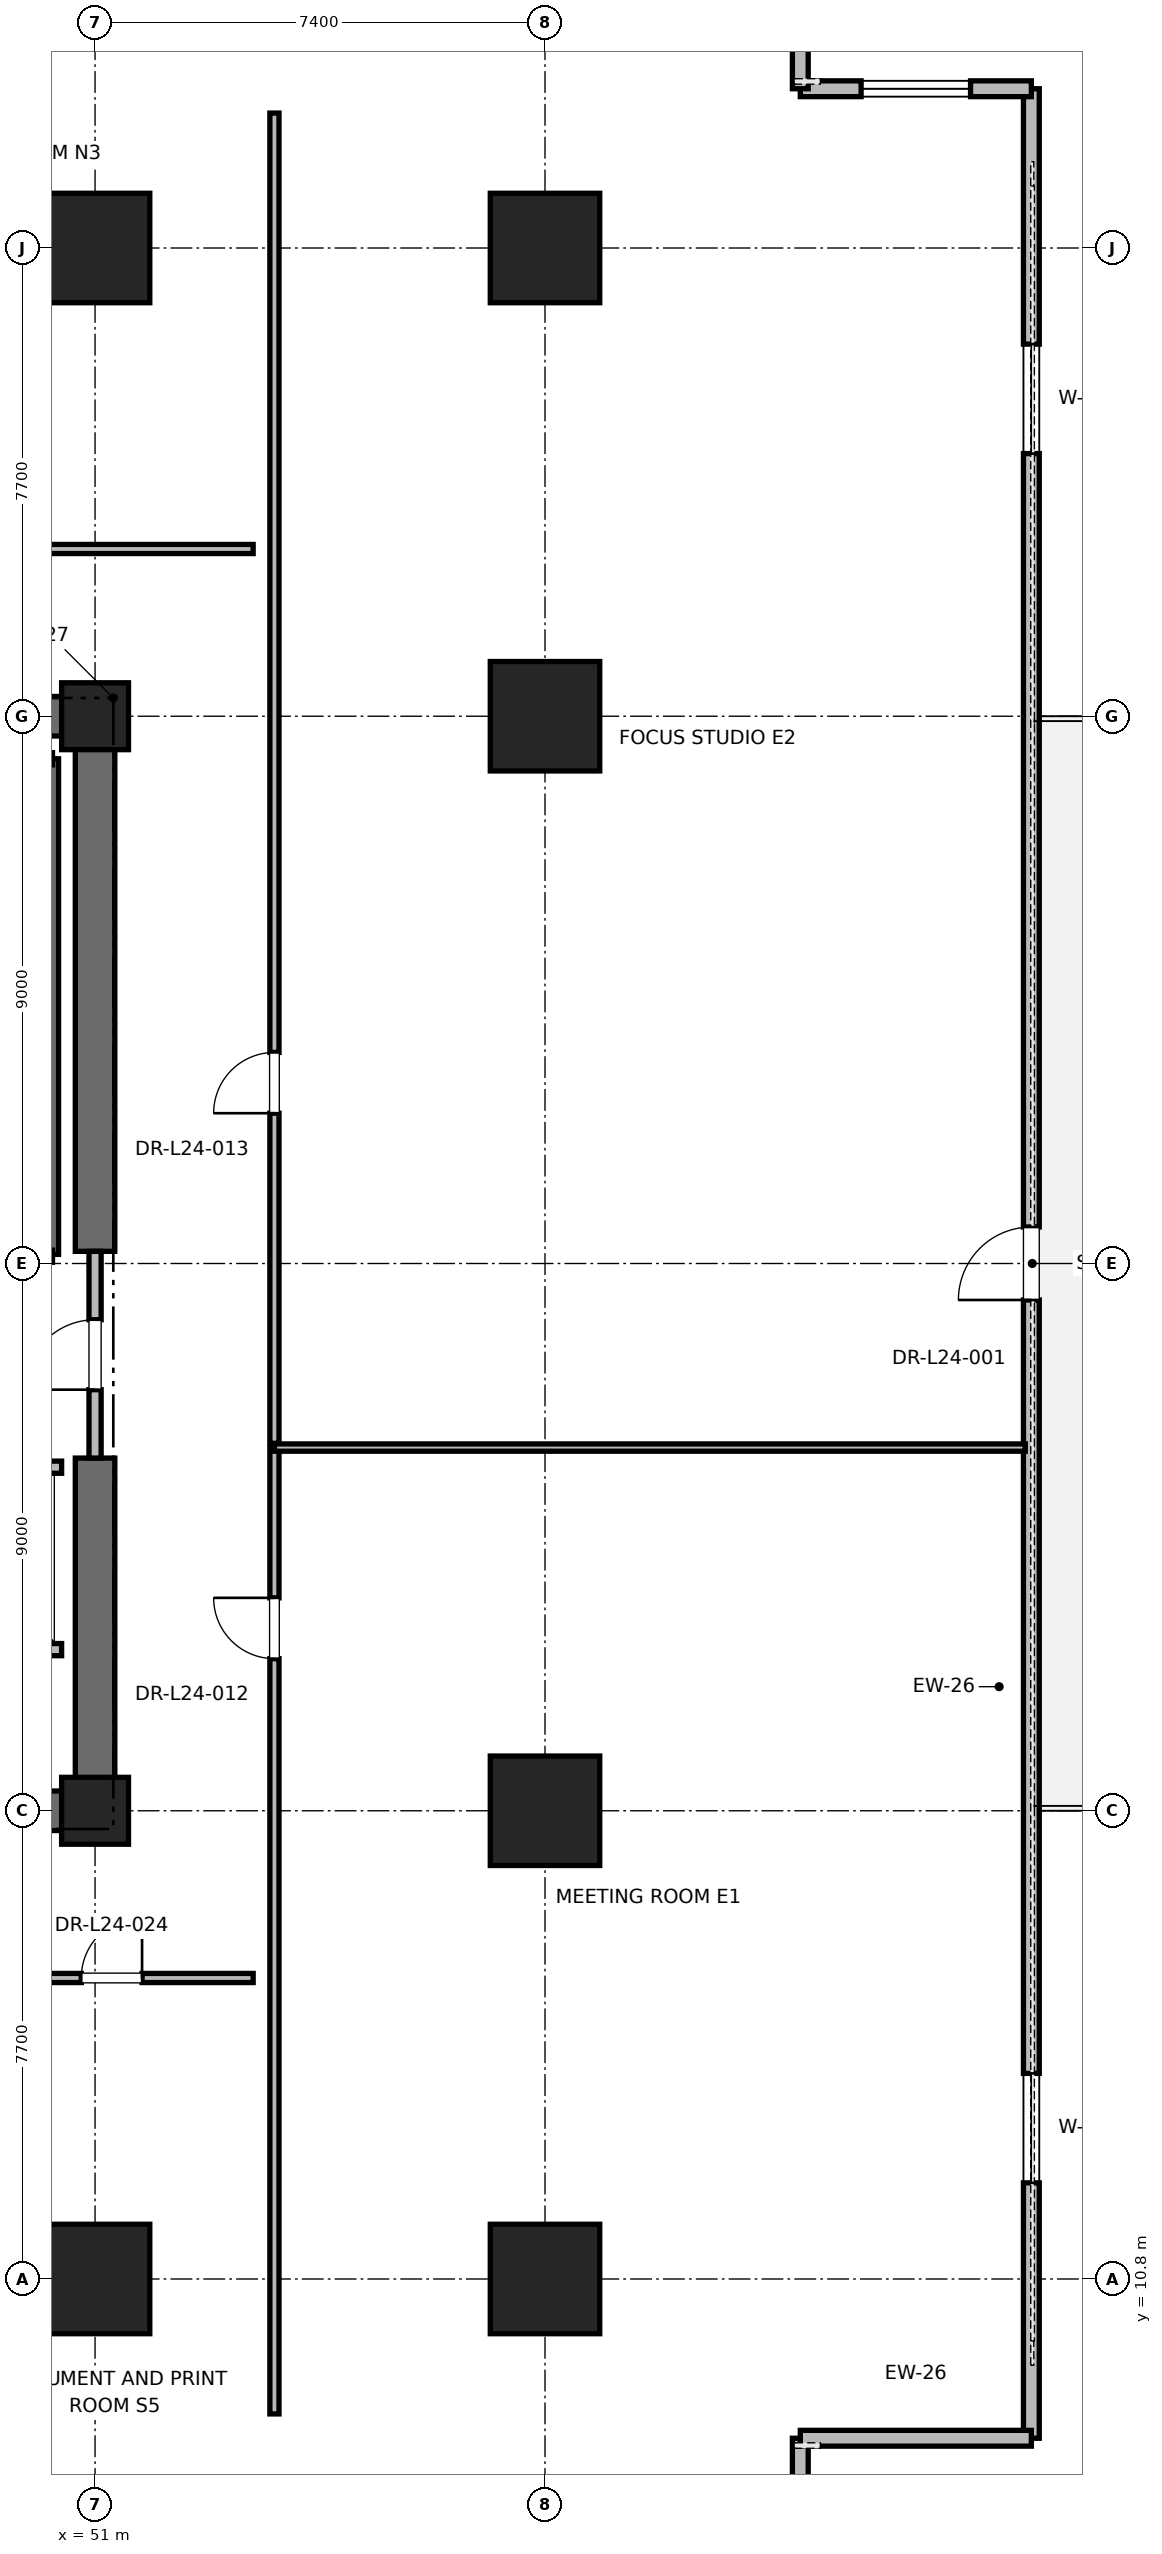
"""IFC4 building model, lengths in metres.
Left out: names, types, materials, properties, quantities, classifications, styles, units other than length and angle.
Written with IfcOpenShell. Run it as: python <this file> out.ifc"""

import sys

from ifc_helpers import new_model, si_unit, direction, frame, frame_2d, origin, origin_2d, place, context, subcontext, project, spatial, rectangle, extrude, element, fill, save


model = new_model("IFC4")
c1 = context("Model", 3, precision=1e-05, world=origin(), true_north=direction((0.0, 1.0)))
c2 = subcontext(c1, "Body", "Model", "MODEL_VIEW")
j1 = project(units=[si_unit("LENGTHUNIT", "METRE"), si_unit("PLANEANGLEUNIT", "RADIAN")], contexts=[c1])
p1 = place(None, origin())
s1 = spatial("IfcSite", under=j1, at=p1, CompositionType="ELEMENT")
p2 = place(p1, origin())
s2 = spatial("IfcBuilding", under=s1, at=p2, CompositionType="ELEMENT")
p3 = place(p2, frame((0.0, 0.0, 103.6)))
s3 = spatial("IfcBuildingStorey", under=s2, at=p3, CompositionType="ELEMENT", Elevation=103.6)
for number, where, z_axis, x_axis in (
    (1, (51.0, 10.8, 0.0), (0.0, 0.0, 1.0), (1.0, 0.0, 0.0)),
    (2, (51.0, 44.2, 0.0), (0.0, 0.0, 1.0), (1.0, 0.0, 0.0)),
    (3, (58.4, 18.5, 0.0), (0.0, 0.0, 1.0), (1.0, 0.0, 0.0)),
    (4, (58.4, 36.5, 0.0), (0.0, 0.0, 1.0), (1.0, 0.0, 0.0)),
    (5, (58.4, 10.8, 0.0), (0.0, 0.0, 1.0), (1.0, 0.0, 0.0)),
    (6, (58.4, 44.2, 0.0), (0.0, 0.0, 1.0), (1.0, 0.0, 0.0)),
):
    element("IfcColumn", number, at=place(p3, frame(where, z_axis=z_axis, x_axis=x_axis)), inside=s3, PredefinedType="COLUMN", context=c2, shape_type="SweptSolid", body=[
        extrude(rectangle(XDim=1.8, YDim=1.8, at=origin_2d()), origin(), (0.0, 0.0, 1.0), 4.0),
    ])
for number, where, z_axis, x_axis in (
    (7, (51.0, 18.5, 0.0), (0.0, 0.0, 1.0), (1.0, 0.0, 0.0)),
    (8, (51.0, 36.5, 0.0), (0.0, 0.0, 1.0), (1.0, 0.0, 0.0)),
):
    element("IfcColumn", number, at=place(p3, frame(where, z_axis=z_axis, x_axis=x_axis)), inside=s3, PredefinedType="PILASTER", context=c2, shape_type="SweptSolid", body=[
        extrude(rectangle(XDim=1.1, YDim=1.1, at=origin_2d()), origin(), (0.0, 0.0, 1.0), 4.0),
    ])
p4 = place(p3, frame((41.8, 18.5, 0.0), z_axis=(0.0, 0.0, 1.0), x_axis=(1.0, 0.0, 0.0)))
e9 = element("IfcWall", 9, at=p4, inside=s3, PredefinedType="SHEAR", context=c2, shape_type="SweptSolid", body=[
    extrude(rectangle(XDim=9.2, YDim=0.65, at=frame_2d((4.6, 0.0))), origin(), (0.0, 0.0, 1.0), 3.7),
])
for number, where, z_axis, x_axis in (
    (10, (45.2, 36.5, 0.0), (0.0, 0.0, 1.0), (1.0, 0.0, 0.0)),
    (11, (51.0, 18.5, 0.0), (0.0, 0.0, 1.0), (0.0, 1.0, 0.0)),
):
    element("IfcWall", number, at=place(p3, frame(where, z_axis=z_axis, x_axis=x_axis)), inside=s3, PredefinedType="SHEAR", context=c2, shape_type="SweptSolid", body=[
        extrude(rectangle(XDim=5.8, YDim=0.65, at=frame_2d((2.9, 0.0))), origin(), (0.0, 0.0, 1.0), 3.7),
    ])
p5 = place(p3, frame((51.0, 27.7, 0.0), z_axis=(0.0, 0.0, 1.0), x_axis=(0.0, 1.0, 0.0)))
e12 = element("IfcWall", 12, at=p5, inside=s3, PredefinedType="SHEAR", context=c2, shape_type="SweptSolid", body=[
    extrude(rectangle(XDim=8.8, YDim=0.65, at=frame_2d((4.4, 0.0))), origin(), (0.0, 0.0, 1.0), 3.7),
])
p6 = place(p3, frame((66.399, 8.181, 0.0), z_axis=(0.0, 0.0, 1.0), x_axis=(0.0, 1.0, 0.0)))
e13 = element("IfcWall", 13, at=p6, inside=s3, PredefinedType="PARAPET", context=c2, shape_type="SweptSolid", body=[
    extrude(rectangle(XDim=38.638, YDim=0.26, at=frame_2d((19.319, 0.0))), origin(), (0.0, 0.0, 1.0), 2.753),
])
p7 = place(p6, frame((4.2, 0.0, 0.85)))
e14 = element("IfcOpeningElement", 14, at=p7, cuts=e13, PredefinedType="OPENING", context=c2, shape_type="SweptSolid", body=[
    extrude(rectangle(XDim=1.8, YDim=2.2, at=frame_2d((0.9, 1.1))), frame((0.0, 0.13, 0.0), z_axis=(0.0, -1.0, 0.0), x_axis=(1.0, 0.0, 0.0)), (0.0, 0.0, 1.0), 0.26),
])
p8 = place(p6, frame((18.719, 0.0, 0.0)))
e15 = element("IfcOpeningElement", 15, at=p8, cuts=e13, PredefinedType="OPENING", context=c2, shape_type="SweptSolid", body=[
    extrude(rectangle(XDim=1.2, YDim=2.2, at=frame_2d((0.6, 1.1))), frame((0.0, 0.13, 0.0), z_axis=(0.0, -1.0, 0.0), x_axis=(1.0, 0.0, 0.0)), (0.0, 0.0, 1.0), 0.26),
])
p9 = place(p6, frame((32.638, 0.0, 0.85)))
e16 = element("IfcOpeningElement", 16, at=p9, cuts=e13, PredefinedType="OPENING", context=c2, shape_type="SweptSolid", body=[
    extrude(rectangle(XDim=1.8, YDim=2.2, at=frame_2d((0.9, 1.1))), frame((0.0, 0.13, 0.0), z_axis=(0.0, -1.0, 0.0), x_axis=(1.0, 0.0, 0.0)), (0.0, 0.0, 1.0), 0.26),
])
p10 = place(p3, frame((62.599, 4.781, 0.0), z_axis=(0.0, 0.0, 1.0), x_axis=(0.0, 1.0, 0.0)))
e17 = element("IfcWall", 17, at=p10, inside=s3, PredefinedType="PARAPET", context=c2, shape_type="SweptSolid", body=[
    extrude(rectangle(XDim=3.4, YDim=0.26, at=frame_2d((1.7, 0.0))), origin(), (0.0, 0.0, 1.0), 3.7),
])
p11 = place(p10, frame((0.8, 0.0, 0.85)))
e18 = element("IfcOpeningElement", 18, at=p11, cuts=e17, PredefinedType="OPENING", context=c2, shape_type="SweptSolid", body=[
    extrude(rectangle(XDim=1.8, YDim=2.2, at=frame_2d((0.9, 1.1))), frame((0.0, 0.13, 0.0), z_axis=(0.0, -1.0, 0.0), x_axis=(1.0, 0.0, 0.0)), (0.0, 0.0, 1.0), 0.26),
])
p12 = place(p3, frame((62.599, 8.181, 0.0), z_axis=(0.0, 0.0, 1.0), x_axis=(1.0, 0.0, 0.0)))
e19 = element("IfcWall", 19, at=p12, inside=s3, PredefinedType="PARAPET", context=c2, shape_type="SweptSolid", body=[
    extrude(rectangle(XDim=3.8, YDim=0.26, at=frame_2d((1.9, 0.0))), origin(), (0.0, 0.0, 1.0), 3.7),
])
p13 = place(p3, frame((66.399, 46.819, 0.0), z_axis=(0.0, 0.0, 1.0), x_axis=(-1.0, 0.0, 0.0)))
e20 = element("IfcWall", 20, at=p13, inside=s3, PredefinedType="PARAPET", context=c2, shape_type="SweptSolid", body=[
    extrude(rectangle(XDim=3.8, YDim=0.26, at=frame_2d((1.9, 0.0))), origin(), (0.0, 0.0, 1.0), 3.7),
])
p14 = place(p13, frame((1.0, 0.0, 0.85)))
e21 = element("IfcOpeningElement", 21, at=p14, cuts=e20, PredefinedType="OPENING", context=c2, shape_type="SweptSolid", body=[
    extrude(rectangle(XDim=1.8, YDim=2.2, at=frame_2d((0.9, 1.1))), frame((0.0, 0.13, 0.0), z_axis=(0.0, -1.0, 0.0), x_axis=(1.0, 0.0, 0.0)), (0.0, 0.0, 1.0), 0.26),
])
p15 = place(p3, frame((62.599, 46.819, 0.0), z_axis=(0.0, 0.0, 1.0), x_axis=(0.0, 1.0, 0.0)))
e22 = element("IfcWall", 22, at=p15, inside=s3, PredefinedType="PARAPET", context=c2, shape_type="SweptSolid", body=[
    extrude(rectangle(XDim=3.4, YDim=0.26, at=frame_2d((1.7, 0.0))), origin(), (0.0, 0.0, 1.0), 3.7),
])
p16 = place(p3, frame((50.3, 27.65, 0.0), z_axis=(0.0, 0.0, 1.0), x_axis=(0.0, 1.0, 0.0)))
e23 = element("IfcWall", 23, at=p16, inside=s3, PredefinedType="SOLIDWALL", context=c2, shape_type="SweptSolid", body=[
    extrude(rectangle(XDim=8.15, YDim=0.2, at=frame_2d((4.075, 0.0))), origin(), (0.0, 0.0, 1.0), 3.7),
])
p17 = place(p3, frame((51.0, 24.3, 0.0), z_axis=(0.0, 0.0, 1.0), x_axis=(0.0, 1.0, 0.0)))
e24 = element("IfcWall", 24, at=p17, inside=s3, PredefinedType="PARTITIONING", context=c2, shape_type="SweptSolid", body=[
    extrude(rectangle(XDim=3.4, YDim=0.2, at=frame_2d((1.7, 0.0))), origin(), (0.0, 0.0, 1.0), 2.48),
])
p18 = place(p17, frame((1.125, 0.0, 0.0)))
e25 = element("IfcOpeningElement", 25, at=p18, cuts=e24, PredefinedType="OPENING", context=c2, shape_type="SweptSolid", body=[
    extrude(rectangle(XDim=1.15, YDim=2.2, at=frame_2d((0.575, 1.1))), frame((0.0, 0.1, 0.0), z_axis=(0.0, -1.0, 0.0), x_axis=(1.0, 0.0, 0.0)), (0.0, 0.0, 1.0), 0.2),
])
p19 = place(p3, frame((47.85, 21.15, 0.0), z_axis=(0.0, 0.0, 1.0), x_axis=(1.0, 0.0, 0.0)))
e26 = element("IfcWall", 26, at=p19, inside=s3, PredefinedType="SOLIDWALL", context=c2, shape_type="SweptSolid", body=[
    extrude(rectangle(XDim=2.6, YDim=0.2, at=frame_2d((1.3, 0.0))), origin(), (0.0, 0.0, 1.0), 3.7),
])
p20 = place(p3, frame((50.45, 24.15, 0.0), z_axis=(0.0, 0.0, 1.0), x_axis=(-1.0, 0.0, 0.0)))
e27 = element("IfcWall", 27, at=p20, inside=s3, PredefinedType="SOLIDWALL", context=c2, shape_type="SweptSolid", body=[
    extrude(rectangle(XDim=2.6, YDim=0.2, at=frame_2d((1.3, 0.0))), origin(), (0.0, 0.0, 1.0), 2.48),
])
p21 = place(p20, frame((0.75, 0.0, 0.0)))
e28 = element("IfcOpeningElement", 28, at=p21, cuts=e27, PredefinedType="OPENING", context=c2, shape_type="SweptSolid", body=[
    extrude(rectangle(XDim=1.1, YDim=2.2, at=frame_2d((0.55, 1.1))), frame((0.0, 0.1, 0.0), z_axis=(0.0, -1.0, 0.0), x_axis=(1.0, 0.0, 0.0)), (0.0, 0.0, 1.0), 0.2),
])
p22 = place(p3, frame((44.694, 39.25, 0.0), z_axis=(0.0, 0.0, 1.0), x_axis=(1.0, 0.0, 0.0)))
e29 = element("IfcWall", 29, at=p22, inside=s3, PredefinedType="PARTITIONING", context=c2, shape_type="SweptSolid", body=[
    extrude(rectangle(XDim=8.906, YDim=0.15, at=frame_2d((4.453, 0.0))), origin(), (0.0, 0.0, 1.0), 2.753),
])
p23 = place(p22, frame((3.653, 0.0, 0.0)))
e30 = element("IfcOpeningElement", 30, at=p23, cuts=e29, PredefinedType="OPENING", context=c2, shape_type="SweptSolid", body=[
    extrude(rectangle(XDim=1.5, YDim=2.25, at=frame_2d((0.75, 1.125))), frame((0.0, 0.075, 0.0), z_axis=(0.0, -1.0, 0.0), x_axis=(1.0, 0.0, 0.0)), (0.0, 0.0, 1.0), 0.15),
])
p24 = place(p3, frame((49.046, 15.75, 0.0), z_axis=(0.0, 0.0, 1.0), x_axis=(1.0, 0.0, 0.0)))
e31 = element("IfcWall", 31, at=p24, inside=s3, PredefinedType="PARTITIONING", context=c2, shape_type="SweptSolid", body=[
    extrude(rectangle(XDim=4.554, YDim=0.15, at=frame_2d((2.277, 0.0))), origin(), (0.0, 0.0, 1.0), 2.753),
])
p25 = place(p24, frame((1.727, 0.0, 0.0)))
e32 = element("IfcOpeningElement", 32, at=p25, cuts=e31, PredefinedType="OPENING", context=c2, shape_type="SweptSolid", body=[
    extrude(rectangle(XDim=1.0, YDim=2.15, at=frame_2d((0.5, 1.075))), frame((0.0, 0.075, 0.0), z_axis=(0.0, -1.0, 0.0), x_axis=(1.0, 0.0, 0.0)), (0.0, 0.0, 1.0), 0.15),
])
p26 = place(p3, frame((53.95, 8.581, 0.0), z_axis=(0.0, 0.0, 1.0), x_axis=(0.0, 1.0, 0.0)))
e33 = element("IfcWall", 33, at=p26, inside=s3, PredefinedType="PARTITIONING", context=c2, shape_type="SweptSolid", body=[
    extrude(rectangle(XDim=15.892, YDim=0.15, at=frame_2d((7.946, 0.0))), origin(), (0.0, 0.0, 1.0), 2.753),
])
p27 = place(p26, frame((12.42, 0.0, 0.0)))
e34 = element("IfcOpeningElement", 34, at=p27, cuts=e33, PredefinedType="OPENING", context=c2, shape_type="SweptSolid", body=[
    extrude(rectangle(XDim=1.0, YDim=2.15, at=frame_2d((0.5, 1.075))), frame((0.0, 0.075, 0.0), z_axis=(0.0, -1.0, 0.0), x_axis=(1.0, 0.0, 0.0)), (0.0, 0.0, 1.0), 0.15),
])
p28 = place(p3, frame((53.95, 24.473, 0.0), z_axis=(0.0, 0.0, 1.0), x_axis=(1.0, 0.0, 0.0)))
e35 = element("IfcWall", 35, at=p28, inside=s3, PredefinedType="PARTITIONING", context=c2, shape_type="SweptSolid", body=[
    extrude(rectangle(XDim=12.349, YDim=0.12, at=frame_2d((6.174, 0.0))), origin(), (0.0, 0.0, 1.0), 2.753),
])
p29 = place(p3, frame((53.95, 24.543, 0.0), z_axis=(0.0, 0.0, 1.0), x_axis=(0.0, 1.0, 0.0)))
e36 = element("IfcWall", 36, at=p29, inside=s3, PredefinedType="PARTITIONING", context=c2, shape_type="SweptSolid", body=[
    extrude(rectangle(XDim=21.876, YDim=0.15, at=frame_2d((10.938, 0.0))), origin(), (0.0, 0.0, 1.0), 2.753),
])
p30 = place(p29, frame((5.428, 0.0, 0.0)))
e37 = element("IfcOpeningElement", 37, at=p30, cuts=e36, PredefinedType="OPENING", context=c2, shape_type="SweptSolid", body=[
    extrude(rectangle(XDim=1.0, YDim=2.15, at=frame_2d((0.5, 1.075))), frame((0.0, 0.075, 0.0), z_axis=(0.0, -1.0, 0.0), x_axis=(1.0, 0.0, 0.0)), (0.0, 0.0, 1.0), 0.15),
])
p31 = place(p7, origin())
e38 = element("IfcWindow", 38, at=p31, inside=s3, PartitioningType="SINGLE_PANEL", PredefinedType="WINDOW", context=c2, shape_type="SweptSolid", body=[
    extrude(rectangle(XDim=1.8, YDim=2.2, at=frame_2d((0.9, 1.1))), frame((0.0, 0.03, 0.0), z_axis=(0.0, -1.0, 0.0), x_axis=(1.0, 0.0, 0.0)), (0.0, 0.0, 1.0), 0.06),
])
fill(e14, e38)
p32 = place(p8, origin())
e39 = element("IfcDoor", 39, at=p32, inside=s3, OperationType="SINGLE_SWING_LEFT", PredefinedType="DOOR", context=c2, shape_type="SweptSolid", body=[
    extrude(rectangle(XDim=1.2, YDim=2.2, at=frame_2d((0.6, 1.1))), frame((0.0, 0.025, 0.0), z_axis=(0.0, -1.0, 0.0), x_axis=(1.0, 0.0, 0.0)), (0.0, 0.0, 1.0), 0.05),
])
fill(e15, e39)
p33 = place(p9, origin())
e40 = element("IfcWindow", 40, at=p33, inside=s3, PartitioningType="SINGLE_PANEL", PredefinedType="WINDOW", context=c2, shape_type="SweptSolid", body=[
    extrude(rectangle(XDim=1.8, YDim=2.2, at=frame_2d((0.9, 1.1))), frame((0.0, 0.03, 0.0), z_axis=(0.0, -1.0, 0.0), x_axis=(1.0, 0.0, 0.0)), (0.0, 0.0, 1.0), 0.06),
])
fill(e16, e40)
p34 = place(p14, origin())
e41 = element("IfcWindow", 41, at=p34, inside=s3, PartitioningType="SINGLE_PANEL", PredefinedType="WINDOW", context=c2, shape_type="SweptSolid", body=[
    extrude(rectangle(XDim=1.8, YDim=2.2, at=frame_2d((0.9, 1.1))), frame((0.0, 0.03, 0.0), z_axis=(0.0, -1.0, 0.0), x_axis=(1.0, 0.0, 0.0)), (0.0, 0.0, 1.0), 0.06),
])
fill(e21, e41)
p35 = place(p18, origin())
e42 = element("IfcDoor", 42, at=p35, inside=s3, OperationType="SINGLE_SWING_LEFT", PredefinedType="DOOR", context=c2, shape_type="SweptSolid", body=[
    extrude(rectangle(XDim=1.15, YDim=2.2, at=frame_2d((0.575, 1.1))), frame((0.0, 0.025, 0.0), z_axis=(0.0, -1.0, 0.0), x_axis=(1.0, 0.0, 0.0)), (0.0, 0.0, 1.0), 0.05),
])
fill(e25, e42)
p36 = place(p25, origin())
e43 = element("IfcDoor", 43, at=p36, inside=s3, OperationType="SINGLE_SWING_RIGHT", PredefinedType="DOOR", context=c2, shape_type="SweptSolid", body=[
    extrude(rectangle(XDim=1.0, YDim=2.15, at=frame_2d((0.5, 1.075))), frame((0.0, 0.025, 0.0), z_axis=(0.0, -1.0, 0.0), x_axis=(1.0, 0.0, 0.0)), (0.0, 0.0, 1.0), 0.05),
])
fill(e32, e43)
p37 = place(p27, origin())
e44 = element("IfcDoor", 44, at=p37, inside=s3, OperationType="SINGLE_SWING_RIGHT", PredefinedType="DOOR", context=c2, shape_type="SweptSolid", body=[
    extrude(rectangle(XDim=1.0, YDim=2.15, at=frame_2d((0.5, 1.075))), frame((0.0, 0.025, 0.0), z_axis=(0.0, -1.0, 0.0), x_axis=(1.0, 0.0, 0.0)), (0.0, 0.0, 1.0), 0.05),
])
fill(e34, e44)
p38 = place(p30, origin())
e45 = element("IfcDoor", 45, at=p38, inside=s3, OperationType="SINGLE_SWING_LEFT", PredefinedType="DOOR", context=c2, shape_type="SweptSolid", body=[
    extrude(rectangle(XDim=1.0, YDim=2.15, at=frame_2d((0.5, 1.075))), frame((0.0, 0.025, 0.0), z_axis=(0.0, -1.0, 0.0), x_axis=(1.0, 0.0, 0.0)), (0.0, 0.0, 1.0), 0.05),
])
fill(e37, e45)
save(model, sys.argv[1])
